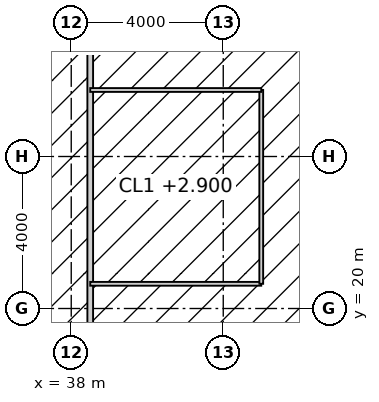
"""IFC4 building model, lengths in metres.
Left out: names, types, materials, properties, quantities, classifications, styles, units other than length and angle.
Written with IfcOpenShell. Run it as: python <this file> out.ifc"""

import sys

from ifc_helpers import new_model, si_unit, direction, frame, frame_2d, origin, place, context, subcontext, project, spatial, rectangle, extrude, element, fill, save


model = new_model("IFC4")
c1 = context("Model", 3, precision=1e-05, world=origin(), true_north=direction((0.0, 1.0)))
c2 = subcontext(c1, "Body", "Model", "MODEL_VIEW")
j1 = project(units=[si_unit("LENGTHUNIT", "METRE"), si_unit("PLANEANGLEUNIT", "RADIAN")], contexts=[c1])
p1 = place(None, origin())
s1 = spatial("IfcSite", under=j1, at=p1, CompositionType="ELEMENT")
p2 = place(p1, origin())
s2 = spatial("IfcBuilding", under=s1, at=p2, CompositionType="ELEMENT")
p3 = place(p2, frame((0.0, 0.0, 254.2)))
s3 = spatial("IfcBuildingStorey", under=s2, at=p3, CompositionType="ELEMENT", Elevation=254.2)
p4 = place(p3, frame((38.5, 15.025, 0.0), z_axis=(0.0, 0.0, 1.0), x_axis=(0.0, 1.0, 0.0)))
e1 = element("IfcWall", 1, at=p4, inside=s3, PredefinedType="PARTITIONING", context=c2, shape_type="SweptSolid", body=[
    extrude(rectangle(XDim=23.35, YDim=0.15, at=frame_2d((11.675, 0.0))), origin(), (0.0, 0.0, 1.0), 3.85),
])
p5 = place(p4, frame((7.275, 0.0, 0.0)))
e2 = element("IfcOpeningElement", 2, at=p5, cuts=e1, PredefinedType="OPENING", context=c2, shape_type="SweptSolid", body=[
    extrude(rectangle(XDim=1.8, YDim=2.4, at=frame_2d((0.9, 1.2))), frame((0.0, 0.085, 0.0), z_axis=(0.0, -1.0, 0.0), x_axis=(1.0, 0.0, 0.0)), (0.0, 0.0, 1.0), 0.17),
])
p6 = place(p4, frame((18.826, 0.0, 0.0)))
e3 = element("IfcOpeningElement", 3, at=p6, cuts=e1, PredefinedType="OPENING", context=c2, shape_type="SweptSolid", body=[
    extrude(rectangle(XDim=1.8, YDim=2.4, at=frame_2d((0.9, 1.2))), frame((0.0, 0.085, 0.0), z_axis=(0.0, -1.0, 0.0), x_axis=(1.0, 0.0, 0.0)), (0.0, 0.0, 1.0), 0.17),
])
p7 = place(p3, frame((38.5, 20.65, 0.0), z_axis=(0.0, 0.0, 1.0), x_axis=(1.0, 0.0, 0.0)))
e4 = element("IfcWall", 4, at=p7, inside=s3, PredefinedType="PARTITIONING", context=c2, shape_type="SweptSolid", body=[
    extrude(rectangle(XDim=4.5, YDim=0.1, at=frame_2d((2.25, 0.0))), origin(), (0.0, 0.0, 1.0), 3.85),
])
p8 = place(p3, frame((43.0, 20.65, 0.0), z_axis=(0.0, 0.0, 1.0), x_axis=(0.0, 1.0, 0.0)))
e5 = element("IfcWall", 5, at=p8, inside=s3, PredefinedType="PARTITIONING", context=c2, shape_type="SweptSolid", body=[
    extrude(rectangle(XDim=5.1, YDim=0.1, at=frame_2d((2.55, 0.0))), origin(), (0.0, 0.0, 1.0), 3.85),
])
p9 = place(p8, frame((2.05, 0.0, 0.0)))
e6 = element("IfcOpeningElement", 6, at=p9, cuts=e5, PredefinedType="OPENING", context=c2, shape_type="SweptSolid", body=[
    extrude(rectangle(XDim=1.0, YDim=2.2, at=frame_2d((0.5, 1.1))), frame((0.0, 0.06, 0.0), z_axis=(0.0, -1.0, 0.0), x_axis=(1.0, 0.0, 0.0)), (0.0, 0.0, 1.0), 0.12),
])
p10 = place(p3, frame((43.0, 25.75, 0.0), z_axis=(0.0, 0.0, 1.0), x_axis=(-1.0, 0.0, 0.0)))
e7 = element("IfcWall", 7, at=p10, inside=s3, PredefinedType="PARTITIONING", context=c2, shape_type="SweptSolid", body=[
    extrude(rectangle(XDim=4.5, YDim=0.1, at=frame_2d((2.25, 0.0))), origin(), (0.0, 0.0, 1.0), 3.85),
])
p11 = place(p5, origin())
e8 = element("IfcDoor", 8, at=p11, inside=s3, OperationType="DOUBLE_DOOR_DOUBLE_SWING", PredefinedType="DOOR", context=c2, shape_type="SweptSolid", body=[
    extrude(rectangle(XDim=1.8, YDim=2.4, at=frame_2d((0.9, 1.2))), frame((0.0, 0.025, 0.0), z_axis=(0.0, -1.0, 0.0), x_axis=(1.0, 0.0, 0.0)), (0.0, 0.0, 1.0), 0.05),
])
fill(e2, e8)
p12 = place(p9, origin())
e9 = element("IfcDoor", 9, at=p12, inside=s3, OperationType="SINGLE_SWING_RIGHT", PredefinedType="DOOR", context=c2, shape_type="SweptSolid", body=[
    extrude(rectangle(XDim=1.0, YDim=2.2, at=frame_2d((0.5, 1.1))), frame((0.0, 0.025, 0.0), z_axis=(0.0, -1.0, 0.0), x_axis=(1.0, 0.0, 0.0)), (0.0, 0.0, 1.0), 0.05),
])
fill(e6, e9)
save(model, sys.argv[1])
